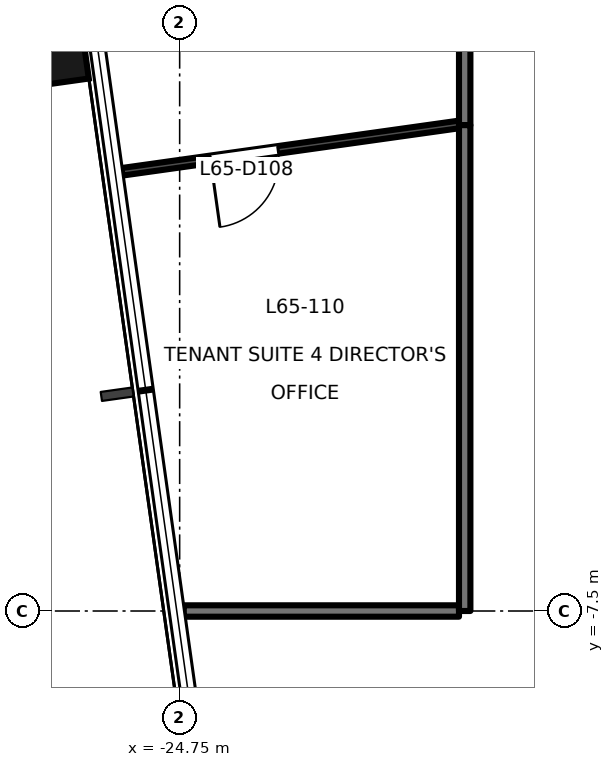
"""IFC4 building model, lengths in metres.
Left out: names, types, materials, properties, quantities, classifications, styles, units other than length and angle.
Written with IfcOpenShell. Run it as: python <this file> out.ifc"""

import sys

from ifc_helpers import new_model, si_unit, direction, frame, frame_2d, origin, origin_2d, place, context, subcontext, project, spatial, rectangle, extrude, element, fill, save


model = new_model("IFC4")
c1 = context("Model", 3, precision=1e-05, world=origin(), true_north=direction((0.0, 1.0)))
c2 = subcontext(c1, "Body", "Model", "MODEL_VIEW")
j1 = project(units=[si_unit("LENGTHUNIT", "METRE"), si_unit("PLANEANGLEUNIT", "RADIAN")], contexts=[c1])
p1 = place(None, origin())
s1 = spatial("IfcSite", under=j1, at=p1, CompositionType="ELEMENT")
p2 = place(p1, origin())
s2 = spatial("IfcBuilding", under=s1, at=p2, CompositionType="ELEMENT")
p3 = place(p2, frame((0.0, 0.0, 282.4)))
s3 = spatial("IfcBuildingStorey", under=s2, at=p3, CompositionType="ELEMENT", Elevation=282.4)
p4 = place(p3, frame((-26.906, -0.125, -0.2), z_axis=(0.0, 0.0, 1.0), x_axis=(-0.139190384377, 0.990265639562, 0.0)))
e1 = element("IfcColumn", 1, at=p4, inside=s3, PredefinedType="COLUMN", context=c2, shape_type="SweptSolid", body=[
    extrude(rectangle(XDim=1.0, YDim=1.8, at=origin_2d()), origin(), (0.0, 0.0, 1.0), 3.9),
])
p5 = place(p3, frame((-21.0, -1.108, 0.0), z_axis=(0.0, 0.0, 1.0), x_axis=(0.0, 1.0, 0.0)))
e2 = element("IfcWall", 2, at=p5, inside=s3, PredefinedType="PARTITIONING", context=c2, shape_type="SweptSolid", body=[
    extrude(rectangle(XDim=6.608, YDim=0.15, at=frame_2d((3.304, 0.0))), origin(), (0.0, 0.0, 1.0), 3.3),
])
p6 = place(p5, frame((3.706, 0.0, 0.0)))
e3 = element("IfcOpeningElement", 3, at=p6, cuts=e2, PredefinedType="OPENING", context=c2, shape_type="SweptSolid", body=[
    extrude(rectangle(XDim=1.5, YDim=2.1, at=frame_2d((0.75, 1.05))), frame((0.0, 0.085, 0.0), z_axis=(0.0, -1.0, 0.0), x_axis=(1.0, 0.0, 0.0)), (0.0, 0.0, 1.0), 0.171),
])
p7 = place(p3, frame((-24.696, -7.5, 0.0), z_axis=(0.0, 0.0, 1.0), x_axis=(1.0, 0.0, 0.0)))
e4 = element("IfcWall", 4, at=p7, inside=s3, PredefinedType="PARTITIONING", context=c2, shape_type="SweptSolid", body=[
    extrude(rectangle(XDim=3.621, YDim=0.15, at=frame_2d((1.811, 0.0))), origin(), (0.0, 0.0, 1.0), 3.7),
])
p8 = place(p3, frame((-21.0, -7.5, 0.0), z_axis=(0.0, 0.0, 1.0), x_axis=(0.0, 1.0, 0.0)))
e5 = element("IfcWall", 5, at=p8, inside=s3, PredefinedType="PARTITIONING", context=c2, shape_type="SweptSolid", body=[
    extrude(rectangle(XDim=6.392, YDim=0.15, at=frame_2d((3.196, 0.0))), origin(), (0.0, 0.0, 1.0), 3.3),
])
p9 = place(p3, frame((-21.068, -1.098, 0.0), z_axis=(0.0, 0.0, 1.0), x_axis=(-0.990271353113, -0.139149729442, 0.0)))
e6 = element("IfcWall", 6, at=p9, inside=s3, PredefinedType="PARTITIONING", context=c2, shape_type="SweptSolid", body=[
    extrude(rectangle(XDim=4.485, YDim=0.1, at=frame_2d((2.242, 0.0))), origin(), (0.0, 0.0, 1.0), 3.7),
])
p10 = place(p9, frame((2.409, 0.0, 0.0)))
e7 = element("IfcOpeningElement", 7, at=p10, cuts=e6, PredefinedType="OPENING", context=c2, shape_type="SweptSolid", body=[
    extrude(rectangle(XDim=0.9, YDim=2.1, at=frame_2d((0.45, 1.05))), frame((0.0, 0.061, 0.0), z_axis=(0.0, -1.0, 0.0), x_axis=(1.0, 0.0, 0.0)), (0.0, 0.0, 1.0), 0.121),
])
p11 = place(p10, origin())
e8 = element("IfcDoor", 8, at=p11, inside=s3, OperationType="SINGLE_SWING_RIGHT", PredefinedType="DOOR", context=c2, shape_type="SweptSolid", body=[
    extrude(rectangle(XDim=0.9, YDim=2.1, at=frame_2d((0.45, 1.05))), frame((0.0, 0.025, 0.0), z_axis=(0.0, -1.0, 0.0), x_axis=(1.0, 0.0, 0.0)), (0.0, 0.0, 1.0), 0.05),
])
fill(e7, e8)
save(model, sys.argv[1])
